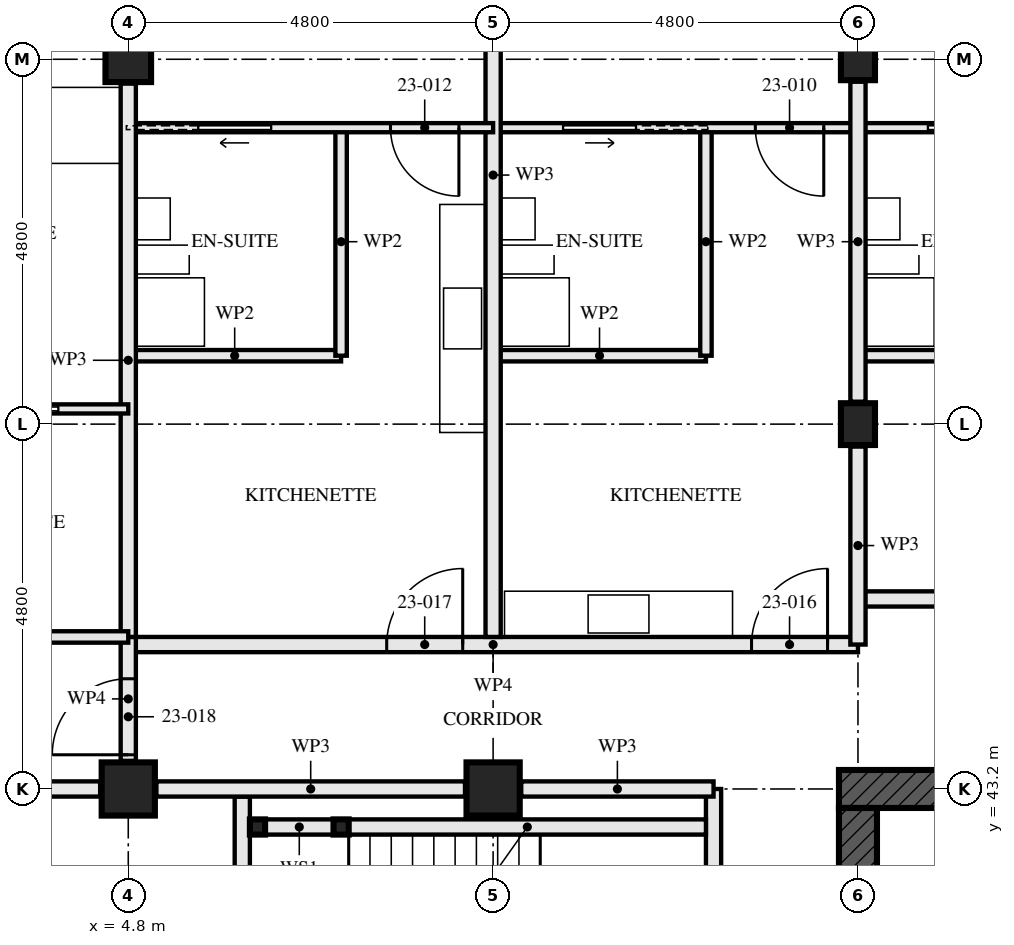
"""IFC4 building model, lengths in metres.
Left out: names, types, materials, properties, quantities, classifications, styles, units other than length and angle.
Written with IfcOpenShell. Run it as: python <this file> out.ifc"""

import sys

from ifc_helpers import new_model, si_unit, direction, frame, frame_2d, origin, origin_2d, place, context, subcontext, project, spatial, rectangle, hollow_rectangle, i_section, extrude, element, fill, save


model = new_model("IFC4")
c1 = context("Model", 3, precision=1e-05, world=origin(), true_north=direction((0.0, 1.0)))
c2 = subcontext(c1, "Body", "Model", "MODEL_VIEW")
j1 = project(units=[si_unit("LENGTHUNIT", "METRE"), si_unit("PLANEANGLEUNIT", "RADIAN")], contexts=[c1])
p1 = place(None, origin())
s1 = spatial("IfcSite", under=j1, at=p1, CompositionType="ELEMENT")
p2 = place(p1, origin())
s2 = spatial("IfcBuilding", under=s1, at=p2, CompositionType="ELEMENT")
p3 = place(p2, frame((0.0, 0.0, 87.5)))
s3 = spatial("IfcBuildingStorey", under=s2, at=p3, CompositionType="ELEMENT", Elevation=87.5)
p4 = place(p3, frame((4.8, 43.2, 0.0), z_axis=(0.0, 0.0, 1.0), x_axis=(0.0, 1.0, 0.0)))
e1 = element("IfcColumn", 1, at=p4, inside=s3, PredefinedType="COLUMN", context=c2, shape_type="SweptSolid", body=[
    extrude(hollow_rectangle(XDim=0.7, YDim=0.7, WallThickness=0.06, at=origin_2d()), origin(), (0.0, 0.0, 1.0), 3.5),
])
p5 = place(p3, frame((4.8, 52.8, 0.0), z_axis=(0.0, 0.0, 1.0), x_axis=(0.0, 1.0, 0.0)))
e2 = element("IfcColumn", 2, at=p5, inside=s3, PredefinedType="COLUMN", context=c2, shape_type="SweptSolid", body=[
    extrude(hollow_rectangle(XDim=0.6, YDim=0.6, WallThickness=0.05, at=origin_2d()), origin(), (0.0, 0.0, 1.0), 3.5),
])
p6 = place(p3, frame((9.6, 43.2, 0.0), z_axis=(0.0, 0.0, 1.0), x_axis=(0.0, 1.0, 0.0)))
e3 = element("IfcColumn", 3, at=p6, inside=s3, PredefinedType="COLUMN", context=c2, shape_type="SweptSolid", body=[
    extrude(hollow_rectangle(XDim=0.7, YDim=0.7, WallThickness=0.06, at=origin_2d()), origin(), (0.0, 0.0, 1.0), 3.5),
])
for number, where, z_axis, x_axis in (
    (4, (14.4, 48.0, 0.0), (0.0, 0.0, 1.0), (1.0, 0.0, 0.0)),
    (5, (14.4, 52.8, 0.0), (0.0, 0.0, 1.0), (1.0, 0.0, 0.0)),
):
    element("IfcColumn", number, at=place(p3, frame(where, z_axis=z_axis, x_axis=x_axis)), inside=s3, PredefinedType="COLUMN", context=c2, shape_type="SweptSolid", body=[
        extrude(i_section(OverallWidth=0.448, OverallDepth=0.55, WebThickness=0.072, FlangeThickness=0.115, FilletRadius=0.015, at=origin_2d()), origin(), (0.0, 0.0, 1.0), 3.5),
    ])
p7 = place(p3, frame((29.05, 43.2, -0.17), z_axis=(0.0, 0.0, 1.0), x_axis=(-1.0, 0.0, 0.0)))
e6 = element("IfcWall", 6, at=p7, inside=s3, PredefinedType="SHEAR", context=c2, shape_type="SweptSolid", body=[
    extrude(rectangle(XDim=14.9, YDim=0.5, at=frame_2d((7.45, 0.0))), origin(), (0.0, 0.0, 1.0), 3.5),
])
p8 = place(p7, frame((6.85, 0.0, 0.17)))
e7 = element("IfcOpeningElement", 7, at=p8, cuts=e6, PredefinedType="OPENING", context=c2, shape_type="SweptSolid", body=[
    extrude(rectangle(XDim=1.2, YDim=2.1, at=frame_2d((0.6, 1.05))), frame((0.0, 0.26, 0.0), z_axis=(0.0, -1.0, 0.0), x_axis=(1.0, 0.0, 0.0)), (0.0, 0.0, 1.0), 0.521),
])
p9 = place(p3, frame((14.4, 42.95, -0.17), z_axis=(0.0, 0.0, 1.0), x_axis=(0.0, -1.0, 0.0)))
e8 = element("IfcWall", 8, at=p9, inside=s3, PredefinedType="SHEAR", context=c2, shape_type="SweptSolid", body=[
    extrude(rectangle(XDim=13.9, YDim=0.5, at=frame_2d((6.95, 0.0))), origin(), (0.0, 0.0, 1.0), 3.5),
])
p10 = place(p9, frame((6.35, 0.0, 0.17)))
e9 = element("IfcOpeningElement", 9, at=p10, cuts=e8, PredefinedType="OPENING", context=c2, shape_type="SweptSolid", body=[
    extrude(rectangle(XDim=1.2, YDim=2.1, at=frame_2d((0.6, 1.05))), frame((0.0, 0.26, 0.0), z_axis=(0.0, -1.0, 0.0), x_axis=(1.0, 0.0, 0.0)), (0.0, 0.0, 1.0), 0.521),
])
for number, where, z_axis, x_axis in (
    (10, (6.5, 42.7, 0.0), (0.0, 0.0, 1.0), (1.0, 0.0, 0.0)),
    (11, (7.6, 42.7, 0.0), (0.0, 0.0, 1.0), (1.0, 0.0, 0.0)),
):
    element("IfcColumn", number, at=place(p3, frame(where, z_axis=z_axis, x_axis=x_axis)), inside=s3, PredefinedType="COLUMN", context=c2, shape_type="SweptSolid", body=[
        extrude(hollow_rectangle(XDim=0.2, YDim=0.2, WallThickness=0.008, at=origin_2d()), origin(), (0.0, 0.0, 1.0), 3.33),
    ])
p11 = place(p3, frame((6.6, 42.7, 0.0), z_axis=(0.0, 0.0, 1.0), x_axis=(1.0, 0.0, 0.0)))
e12 = element("IfcWall", 12, at=p11, inside=s3, PredefinedType="SOLIDWALL", context=c2, shape_type="SweptSolid", body=[
    extrude(rectangle(XDim=0.9, YDim=0.2, at=frame_2d((0.45, 0.0))), origin(), (0.0, 0.0, 1.0), 2.99),
])
p12 = place(p3, frame((7.7, 42.7, 0.0), z_axis=(0.0, 0.0, 1.0), x_axis=(1.0, 0.0, 0.0)))
e13 = element("IfcWall", 13, at=p12, inside=s3, PredefinedType="SOLIDWALL", context=c2, shape_type="SweptSolid", body=[
    extrude(rectangle(XDim=4.7, YDim=0.2, at=frame_2d((2.35, 0.0))), origin(), (0.0, 0.0, 1.0), 2.99),
])
p13 = place(p3, frame((6.3, 43.1, 0.0), z_axis=(0.0, 0.0, 1.0), x_axis=(0.0, -1.0, 0.0)))
e14 = element("IfcWall", 14, at=p13, inside=s3, PredefinedType="SOLIDWALL", context=c2, shape_type="SweptSolid", body=[
    extrude(rectangle(XDim=3.3, YDim=0.2, at=frame_2d((1.65, 0.0))), origin(), (0.0, 0.0, 1.0), 3.33),
])
p14 = place(p3, frame((12.5, 43.2, 0.0), z_axis=(0.0, 0.0, 1.0), x_axis=(0.0, -1.0, 0.0)))
e15 = element("IfcWall", 15, at=p14, inside=s3, PredefinedType="PARTITIONING", context=c2, shape_type="SweptSolid", body=[
    extrude(rectangle(XDim=14.84, YDim=0.2, at=frame_2d((7.42, 0.0))), origin(), (0.0, 0.0, 1.0), 2.32),
])
p15 = place(p14, frame((1.4, 0.0, 0.0)))
e16 = element("IfcOpeningElement", 16, at=p15, cuts=e15, PredefinedType="OPENING", context=c2, shape_type="SweptSolid", body=[
    extrude(rectangle(XDim=1.0, YDim=2.1, at=frame_2d((0.5, 1.05))), frame((0.0, 0.111, 0.0), z_axis=(0.0, -1.0, 0.0), x_axis=(1.0, 0.0, 0.0)), (0.0, 0.0, 1.0), 0.221),
])
p16 = place(p14, frame((5.2, 0.0, 0.0)))
e17 = element("IfcOpeningElement", 17, at=p16, cuts=e15, PredefinedType="OPENING", context=c2, shape_type="SweptSolid", body=[
    extrude(rectangle(XDim=1.0, YDim=2.1, at=frame_2d((0.5, 1.05))), frame((0.0, 0.111, 0.0), z_axis=(0.0, -1.0, 0.0), x_axis=(1.0, 0.0, 0.0)), (0.0, 0.0, 1.0), 0.221),
])
p17 = place(p14, frame((13.0, 0.0, 0.0)))
e18 = element("IfcOpeningElement", 18, at=p17, cuts=e15, PredefinedType="OPENING", context=c2, shape_type="SweptSolid", body=[
    extrude(rectangle(XDim=1.0, YDim=2.1, at=frame_2d((0.5, 1.05))), frame((0.0, 0.111, 0.0), z_axis=(0.0, -1.0, 0.0), x_axis=(1.0, 0.0, 0.0)), (0.0, 0.0, 1.0), 0.221),
])
p18 = place(p3, frame((12.4, 51.9, 0.0), z_axis=(0.0, 0.0, 1.0), x_axis=(0.0, -1.0, 0.0)))
e19 = element("IfcWall", 19, at=p18, inside=s3, PredefinedType="PARTITIONING", context=c2, shape_type="SweptSolid", body=[
    extrude(rectangle(XDim=3.0, YDim=0.15, at=frame_2d((1.5, 0.0))), origin(), (0.0, 0.0, 1.0), 3.33),
])
p19 = place(p3, frame((12.4, 48.9, 0.0), z_axis=(0.0, 0.0, 1.0), x_axis=(-1.0, 0.0, 0.0)))
e20 = element("IfcWall", 20, at=p19, inside=s3, PredefinedType="PARTITIONING", context=c2, shape_type="SweptSolid", body=[
    extrude(rectangle(XDim=2.8, YDim=0.15, at=frame_2d((1.4, 0.0))), origin(), (0.0, 0.0, 1.0), 3.33),
])
p20 = place(p3, frame((14.4, 51.9, 0.0), z_axis=(0.0, 0.0, 1.0), x_axis=(-1.0, 0.0, 0.0)))
e21 = element("IfcWall", 21, at=p20, inside=s3, PredefinedType="PARTITIONING", context=c2, shape_type="SweptSolid", body=[
    extrude(rectangle(XDim=4.8, YDim=0.12, at=frame_2d((2.4, 0.0))), origin(), (0.0, 0.0, 1.0), 3.33),
])
p21 = place(p20, frame((0.45, 0.0, 0.0)))
e22 = element("IfcOpeningElement", 22, at=p21, cuts=e21, PredefinedType="OPENING", context=c2, shape_type="SweptSolid", body=[
    extrude(rectangle(XDim=0.9, YDim=2.1, at=frame_2d((0.45, 1.05))), frame((0.0, 0.071, 0.0), z_axis=(0.0, -1.0, 0.0), x_axis=(1.0, 0.0, 0.0)), (0.0, 0.0, 1.0), 0.141),
])
p22 = place(p20, frame((2.925, 0.0, 0.0)))
e23 = element("IfcOpeningElement", 23, at=p22, cuts=e21, PredefinedType="OPENING", context=c2, shape_type="SweptSolid", body=[
    extrude(rectangle(XDim=0.95, YDim=2.1, at=frame_2d((0.475, 1.05))), frame((0.0, 0.071, 0.0), z_axis=(0.0, -1.0, 0.0), x_axis=(1.0, 0.0, 0.0)), (0.0, 0.0, 1.0), 0.141),
])
p23 = place(p3, frame((9.6, 57.353, 0.0), z_axis=(0.0, 0.0, 1.0), x_axis=(0.0, -1.0, 0.0)))
e24 = element("IfcWall", 24, at=p23, inside=s3, PredefinedType="PARTITIONING", context=c2, shape_type="SweptSolid", body=[
    extrude(rectangle(XDim=12.153, YDim=0.2, at=frame_2d((6.077, 0.0))), origin(), (0.0, 0.0, 1.0), 2.55),
])
p24 = place(p3, frame((7.6, 51.9, 0.0), z_axis=(0.0, 0.0, 1.0), x_axis=(0.0, -1.0, 0.0)))
e25 = element("IfcWall", 25, at=p24, inside=s3, PredefinedType="PARTITIONING", context=c2, shape_type="SweptSolid", body=[
    extrude(rectangle(XDim=3.0, YDim=0.15, at=frame_2d((1.5, 0.0))), origin(), (0.0, 0.0, 1.0), 3.33),
])
p25 = place(p3, frame((7.6, 48.9, 0.0), z_axis=(0.0, 0.0, 1.0), x_axis=(-1.0, 0.0, 0.0)))
e26 = element("IfcWall", 26, at=p25, inside=s3, PredefinedType="PARTITIONING", context=c2, shape_type="SweptSolid", body=[
    extrude(rectangle(XDim=2.8, YDim=0.15, at=frame_2d((1.4, 0.0))), origin(), (0.0, 0.0, 1.0), 3.33),
])
p26 = place(p3, frame((9.6, 51.9, 0.0), z_axis=(0.0, 0.0, 1.0), x_axis=(-1.0, 0.0, 0.0)))
e27 = element("IfcWall", 27, at=p26, inside=s3, PredefinedType="PARTITIONING", context=c2, shape_type="SweptSolid", body=[
    extrude(rectangle(XDim=4.8, YDim=0.12, at=frame_2d((2.4, 0.0))), origin(), (0.0, 0.0, 1.0), 3.33),
])
p27 = place(p26, frame((0.45, 0.0, 0.0)))
e28 = element("IfcOpeningElement", 28, at=p27, cuts=e27, PredefinedType="OPENING", context=c2, shape_type="SweptSolid", body=[
    extrude(rectangle(XDim=0.9, YDim=2.1, at=frame_2d((0.45, 1.05))), frame((0.0, 0.071, 0.0), z_axis=(0.0, -1.0, 0.0), x_axis=(1.0, 0.0, 0.0)), (0.0, 0.0, 1.0), 0.141),
])
p28 = place(p26, frame((2.925, 0.0, 0.0)))
e29 = element("IfcOpeningElement", 29, at=p28, cuts=e27, PredefinedType="OPENING", context=c2, shape_type="SweptSolid", body=[
    extrude(rectangle(XDim=0.95, YDim=2.1, at=frame_2d((0.475, 1.05))), frame((0.0, 0.071, 0.0), z_axis=(0.0, -1.0, 0.0), x_axis=(1.0, 0.0, 0.0)), (0.0, 0.0, 1.0), 0.141),
])
p29 = place(p3, frame((4.8, 52.48, 0.0), z_axis=(0.0, 0.0, 1.0), x_axis=(0.0, -1.0, 0.0)))
e30 = element("IfcWall", 30, at=p29, inside=s3, PredefinedType="PARTITIONING", context=c2, shape_type="SweptSolid", body=[
    extrude(rectangle(XDim=7.28, YDim=0.2, at=frame_2d((3.64, 0.0))), origin(), (0.0, 0.0, 1.0), 2.55),
])
p30 = place(p3, frame((4.8, 45.2, 0.0), z_axis=(0.0, 0.0, 1.0), x_axis=(-1.0, 0.0, 0.0)))
e31 = element("IfcWall", 31, at=p30, inside=s3, PredefinedType="PARTITIONING", context=c2, shape_type="SweptSolid", body=[
    extrude(rectangle(XDim=2.8, YDim=0.15, at=frame_2d((1.4, 0.0))), origin(), (0.0, 0.0, 1.0), 3.33),
])
p31 = place(p3, frame((4.8, 48.2, 0.0), z_axis=(0.0, 0.0, 1.0), x_axis=(-1.0, 0.0, 0.0)))
e32 = element("IfcWall", 32, at=p31, inside=s3, PredefinedType="PARTITIONING", context=c2, shape_type="SweptSolid", body=[
    extrude(rectangle(XDim=4.553, YDim=0.12, at=frame_2d((2.276, 0.0))), origin(), (0.0, 0.0, 1.0), 3.33),
])
p32 = place(p31, frame((2.975, 0.0, 0.0)))
e33 = element("IfcOpeningElement", 33, at=p32, cuts=e32, PredefinedType="OPENING", context=c2, shape_type="SweptSolid", body=[
    extrude(rectangle(XDim=0.9, YDim=2.1, at=frame_2d((0.45, 1.05))), frame((0.0, 0.071, 0.0), z_axis=(0.0, -1.0, 0.0), x_axis=(1.0, 0.0, 0.0)), (0.0, 0.0, 1.0), 0.141),
])
p33 = place(p31, frame((0.925, 0.0, 0.0)))
e34 = element("IfcOpeningElement", 34, at=p33, cuts=e32, PredefinedType="OPENING", context=c2, shape_type="SweptSolid", body=[
    extrude(rectangle(XDim=0.95, YDim=2.1, at=frame_2d((0.475, 1.05))), frame((0.0, 0.071, 0.0), z_axis=(0.0, -1.0, 0.0), x_axis=(1.0, 0.0, 0.0)), (0.0, 0.0, 1.0), 0.141),
])
p34 = place(p3, frame((14.4, 45.1, 0.0), z_axis=(0.0, 0.0, 1.0), x_axis=(-1.0, 0.0, 0.0)))
e35 = element("IfcWall", 35, at=p34, inside=s3, PredefinedType="PARTITIONING", context=c2, shape_type="SweptSolid", body=[
    extrude(rectangle(XDim=9.6, YDim=0.2, at=frame_2d((4.8, 0.0))), origin(), (0.0, 0.0, 1.0), 3.33),
])
p35 = place(p34, frame((0.4, 0.0, 0.0)))
e36 = element("IfcOpeningElement", 36, at=p35, cuts=e35, PredefinedType="OPENING", context=c2, shape_type="SweptSolid", body=[
    extrude(rectangle(XDim=1.0, YDim=2.1, at=frame_2d((0.5, 1.05))), frame((0.0, 0.111, 0.0), z_axis=(0.0, -1.0, 0.0), x_axis=(1.0, 0.0, 0.0)), (0.0, 0.0, 1.0), 0.221),
])
p36 = place(p34, frame((5.2, 0.0, 0.0)))
e37 = element("IfcOpeningElement", 37, at=p36, cuts=e35, PredefinedType="OPENING", context=c2, shape_type="SweptSolid", body=[
    extrude(rectangle(XDim=1.0, YDim=2.1, at=frame_2d((0.5, 1.05))), frame((0.0, 0.111, 0.0), z_axis=(0.0, -1.0, 0.0), x_axis=(1.0, 0.0, 0.0)), (0.0, 0.0, 1.0), 0.221),
])
p37 = place(p3, frame((4.8, 45.2, 0.0), z_axis=(0.0, 0.0, 1.0), x_axis=(0.0, -1.0, 0.0)))
e38 = element("IfcWall", 38, at=p37, inside=s3, PredefinedType="PARTITIONING", context=c2, shape_type="SweptSolid", body=[
    extrude(rectangle(XDim=1.63, YDim=0.2, at=frame_2d((0.815, 0.0))), origin(), (0.0, 0.0, 1.0), 3.33),
])
p38 = place(p37, frame((0.55, 0.0, 0.0)))
e39 = element("IfcOpeningElement", 39, at=p38, cuts=e38, PredefinedType="OPENING", context=c2, shape_type="SweptSolid", body=[
    extrude(rectangle(XDim=1.0, YDim=2.1, at=frame_2d((0.5, 1.05))), frame((0.0, 0.111, 0.0), z_axis=(0.0, -1.0, 0.0), x_axis=(1.0, 0.0, 0.0)), (0.0, 0.0, 1.0), 0.221),
])
p39 = place(p3, frame((17.2, 48.9, 0.0), z_axis=(0.0, 0.0, 1.0), x_axis=(-1.0, 0.0, 0.0)))
e40 = element("IfcWall", 40, at=p39, inside=s3, PredefinedType="PARTITIONING", context=c2, shape_type="SweptSolid", body=[
    extrude(rectangle(XDim=2.8, YDim=0.15, at=frame_2d((1.4, 0.0))), origin(), (0.0, 0.0, 1.0), 3.33),
])
p40 = place(p3, frame((19.2, 51.9, 0.0), z_axis=(0.0, 0.0, 1.0), x_axis=(-1.0, 0.0, 0.0)))
e41 = element("IfcWall", 41, at=p40, inside=s3, PredefinedType="PARTITIONING", context=c2, shape_type="SweptSolid", body=[
    extrude(rectangle(XDim=4.8, YDim=0.12, at=frame_2d((2.4, 0.0))), origin(), (0.0, 0.0, 1.0), 3.33),
])
p41 = place(p40, frame((0.45, 0.0, 0.0)))
e42 = element("IfcOpeningElement", 42, at=p41, cuts=e41, PredefinedType="OPENING", context=c2, shape_type="SweptSolid", body=[
    extrude(rectangle(XDim=0.9, YDim=2.1, at=frame_2d((0.45, 1.05))), frame((0.0, 0.071, 0.0), z_axis=(0.0, -1.0, 0.0), x_axis=(1.0, 0.0, 0.0)), (0.0, 0.0, 1.0), 0.141),
])
p42 = place(p40, frame((2.925, 0.0, 0.0)))
e43 = element("IfcOpeningElement", 43, at=p42, cuts=e41, PredefinedType="OPENING", context=c2, shape_type="SweptSolid", body=[
    extrude(rectangle(XDim=0.95, YDim=2.1, at=frame_2d((0.475, 1.05))), frame((0.0, 0.071, 0.0), z_axis=(0.0, -1.0, 0.0), x_axis=(1.0, 0.0, 0.0)), (0.0, 0.0, 1.0), 0.141),
])
p43 = place(p3, frame((29.24, 45.7, 0.0), z_axis=(0.0, 0.0, 1.0), x_axis=(-1.0, 0.0, 0.0)))
e44 = element("IfcWall", 44, at=p43, inside=s3, PredefinedType="PARTITIONING", context=c2, shape_type="SweptSolid", body=[
    extrude(rectangle(XDim=14.84, YDim=0.2, at=frame_2d((7.42, 0.0))), origin(), (0.0, 0.0, 1.0), 2.32),
])
p44 = place(p43, frame((0.84, 0.0, 0.0)))
e45 = element("IfcOpeningElement", 45, at=p44, cuts=e44, PredefinedType="OPENING", context=c2, shape_type="SweptSolid", body=[
    extrude(rectangle(XDim=1.0, YDim=2.1, at=frame_2d((0.5, 1.05))), frame((0.0, 0.111, 0.0), z_axis=(0.0, -1.0, 0.0), x_axis=(1.0, 0.0, 0.0)), (0.0, 0.0, 1.0), 0.221),
])
p45 = place(p43, frame((5.64, 0.0, 0.0)))
e46 = element("IfcOpeningElement", 46, at=p45, cuts=e44, PredefinedType="OPENING", context=c2, shape_type="SweptSolid", body=[
    extrude(rectangle(XDim=1.0, YDim=2.1, at=frame_2d((0.5, 1.05))), frame((0.0, 0.111, 0.0), z_axis=(0.0, -1.0, 0.0), x_axis=(1.0, 0.0, 0.0)), (0.0, 0.0, 1.0), 0.221),
])
p46 = place(p43, frame((10.44, 0.0, 0.0)))
e47 = element("IfcOpeningElement", 47, at=p46, cuts=e44, PredefinedType="OPENING", context=c2, shape_type="SweptSolid", body=[
    extrude(rectangle(XDim=1.0, YDim=2.1, at=frame_2d((0.5, 1.05))), frame((0.0, 0.111, 0.0), z_axis=(0.0, -1.0, 0.0), x_axis=(1.0, 0.0, 0.0)), (0.0, 0.0, 1.0), 0.221),
])
p47 = place(p3, frame((12.5, 43.2, 0.0), z_axis=(0.0, 0.0, 1.0), x_axis=(-1.0, 0.0, 0.0)))
e48 = element("IfcWall", 48, at=p47, inside=s3, PredefinedType="PARTITIONING", context=c2, shape_type="SweptSolid", body=[
    extrude(rectangle(XDim=2.53, YDim=0.2, at=frame_2d((1.265, 0.0))), origin(), (0.0, 0.0, 1.0), 2.32),
])
p48 = place(p3, frame((9.23, 43.2, 0.0), z_axis=(0.0, 0.0, 1.0), x_axis=(-1.0, 0.0, 0.0)))
e49 = element("IfcWall", 49, at=p48, inside=s3, PredefinedType="PARTITIONING", context=c2, shape_type="SweptSolid", body=[
    extrude(rectangle(XDim=4.06, YDim=0.2, at=frame_2d((2.03, 0.0))), origin(), (0.0, 0.0, 1.0), 2.32),
])
p49 = place(p3, frame((4.43, 43.2, 0.0), z_axis=(0.0, 0.0, 1.0), x_axis=(-1.0, 0.0, 0.0)))
e50 = element("IfcWall", 50, at=p49, inside=s3, PredefinedType="PARTITIONING", context=c2, shape_type="SweptSolid", body=[
    extrude(rectangle(XDim=4.125, YDim=0.2, at=frame_2d((2.063, 0.0))), origin(), (0.0, 0.0, 1.0), 2.32),
])
p50 = place(p3, frame((14.4, 45.1, 0.0), z_axis=(0.0, 0.0, 1.0), x_axis=(0.0, 1.0, 0.0)))
e51 = element("IfcWall", 51, at=p50, inside=s3, PredefinedType="PARTITIONING", context=c2, shape_type="SweptSolid", body=[
    extrude(rectangle(XDim=2.605, YDim=0.2, at=frame_2d((1.302, 0.0))), origin(), (0.0, 0.0, 1.0), 2.32),
])
p51 = place(p3, frame((14.4, 48.295, 0.0), z_axis=(0.0, 0.0, 1.0), x_axis=(0.0, 1.0, 0.0)))
e52 = element("IfcWall", 52, at=p51, inside=s3, PredefinedType="PARTITIONING", context=c2, shape_type="SweptSolid", body=[
    extrude(rectangle(XDim=4.21, YDim=0.2, at=frame_2d((2.105, 0.0))), origin(), (0.0, 0.0, 1.0), 2.32),
])
p52 = place(p21, origin())
e53 = element("IfcDoor", 53, at=p52, inside=s3, OperationType="SINGLE_SWING_RIGHT", PredefinedType="DOOR", context=c2, shape_type="SweptSolid", body=[
    extrude(rectangle(XDim=0.9, YDim=2.1, at=frame_2d((0.45, 1.05))), frame((0.0, 0.022, 0.0), z_axis=(0.0, -1.0, 0.0), x_axis=(1.0, 0.0, 0.0)), (0.0, 0.0, 1.0), 0.044),
])
fill(e22, e53)
p53 = place(p22, origin())
e54 = element("IfcDoor", 54, at=p53, inside=s3, OperationType="SLIDING_TO_RIGHT", PredefinedType="DOOR", context=c2, shape_type="SweptSolid", body=[
    extrude(rectangle(XDim=0.95, YDim=2.1, at=frame_2d((0.475, 1.05))), frame((0.0, 0.022, 0.0), z_axis=(0.0, -1.0, 0.0), x_axis=(1.0, 0.0, 0.0)), (0.0, 0.0, 1.0), 0.044),
])
fill(e23, e54)
p54 = place(p27, origin())
e55 = element("IfcDoor", 55, at=p54, inside=s3, OperationType="SINGLE_SWING_RIGHT", PredefinedType="DOOR", context=c2, shape_type="SweptSolid", body=[
    extrude(rectangle(XDim=0.9, YDim=2.1, at=frame_2d((0.45, 1.05))), frame((0.0, 0.022, 0.0), z_axis=(0.0, -1.0, 0.0), x_axis=(1.0, 0.0, 0.0)), (0.0, 0.0, 1.0), 0.044),
])
fill(e28, e55)
p55 = place(p28, origin())
e56 = element("IfcDoor", 56, at=p55, inside=s3, OperationType="SLIDING_TO_LEFT", PredefinedType="DOOR", context=c2, shape_type="SweptSolid", body=[
    extrude(rectangle(XDim=0.95, YDim=2.1, at=frame_2d((0.475, 1.05))), frame((0.0, 0.022, 0.0), z_axis=(0.0, -1.0, 0.0), x_axis=(1.0, 0.0, 0.0)), (0.0, 0.0, 1.0), 0.044),
])
fill(e29, e56)
p56 = place(p33, origin())
e57 = element("IfcDoor", 57, at=p56, inside=s3, OperationType="SLIDING_TO_LEFT", PredefinedType="DOOR", context=c2, shape_type="SweptSolid", body=[
    extrude(rectangle(XDim=0.95, YDim=2.1, at=frame_2d((0.475, 1.05))), frame((0.0, 0.022, 0.0), z_axis=(0.0, -1.0, 0.0), x_axis=(1.0, 0.0, 0.0)), (0.0, 0.0, 1.0), 0.044),
])
fill(e34, e57)
p57 = place(p35, frame((1.0, 0.0, 0.0), z_axis=(0.0, 0.0, 1.0), x_axis=(-1.0, 0.0, 0.0)))
e58 = element("IfcDoor", 58, at=p57, inside=s3, OperationType="SINGLE_SWING_LEFT", PredefinedType="DOOR", context=c2, shape_type="SweptSolid", body=[
    extrude(rectangle(XDim=1.0, YDim=2.1, at=frame_2d((0.5, 1.05))), frame((0.0, 0.027, 0.0), z_axis=(0.0, -1.0, 0.0), x_axis=(1.0, 0.0, 0.0)), (0.0, 0.0, 1.0), 0.054),
])
fill(e36, e58)
p58 = place(p36, frame((1.0, 0.0, 0.0), z_axis=(0.0, 0.0, 1.0), x_axis=(-1.0, 0.0, 0.0)))
e59 = element("IfcDoor", 59, at=p58, inside=s3, OperationType="SINGLE_SWING_LEFT", PredefinedType="DOOR", context=c2, shape_type="SweptSolid", body=[
    extrude(rectangle(XDim=1.0, YDim=2.1, at=frame_2d((0.5, 1.05))), frame((0.0, 0.027, 0.0), z_axis=(0.0, -1.0, 0.0), x_axis=(1.0, 0.0, 0.0)), (0.0, 0.0, 1.0), 0.054),
])
fill(e37, e59)
p59 = place(p38, frame((1.0, 0.0, 0.0), z_axis=(0.0, 0.0, 1.0), x_axis=(-1.0, 0.0, 0.0)))
e60 = element("IfcDoor", 60, at=p59, inside=s3, OperationType="SINGLE_SWING_RIGHT", PredefinedType="DOOR", context=c2, shape_type="SweptSolid", body=[
    extrude(rectangle(XDim=1.0, YDim=2.1, at=frame_2d((0.5, 1.05))), frame((0.0, 0.027, 0.0), z_axis=(0.0, -1.0, 0.0), x_axis=(1.0, 0.0, 0.0)), (0.0, 0.0, 1.0), 0.054),
])
fill(e39, e60)
p60 = place(p42, origin())
e61 = element("IfcDoor", 61, at=p60, inside=s3, OperationType="SLIDING_TO_RIGHT", PredefinedType="DOOR", context=c2, shape_type="SweptSolid", body=[
    extrude(rectangle(XDim=0.95, YDim=2.1, at=frame_2d((0.475, 1.05))), frame((0.0, 0.022, 0.0), z_axis=(0.0, -1.0, 0.0), x_axis=(1.0, 0.0, 0.0)), (0.0, 0.0, 1.0), 0.044),
])
fill(e43, e61)
save(model, sys.argv[1])
